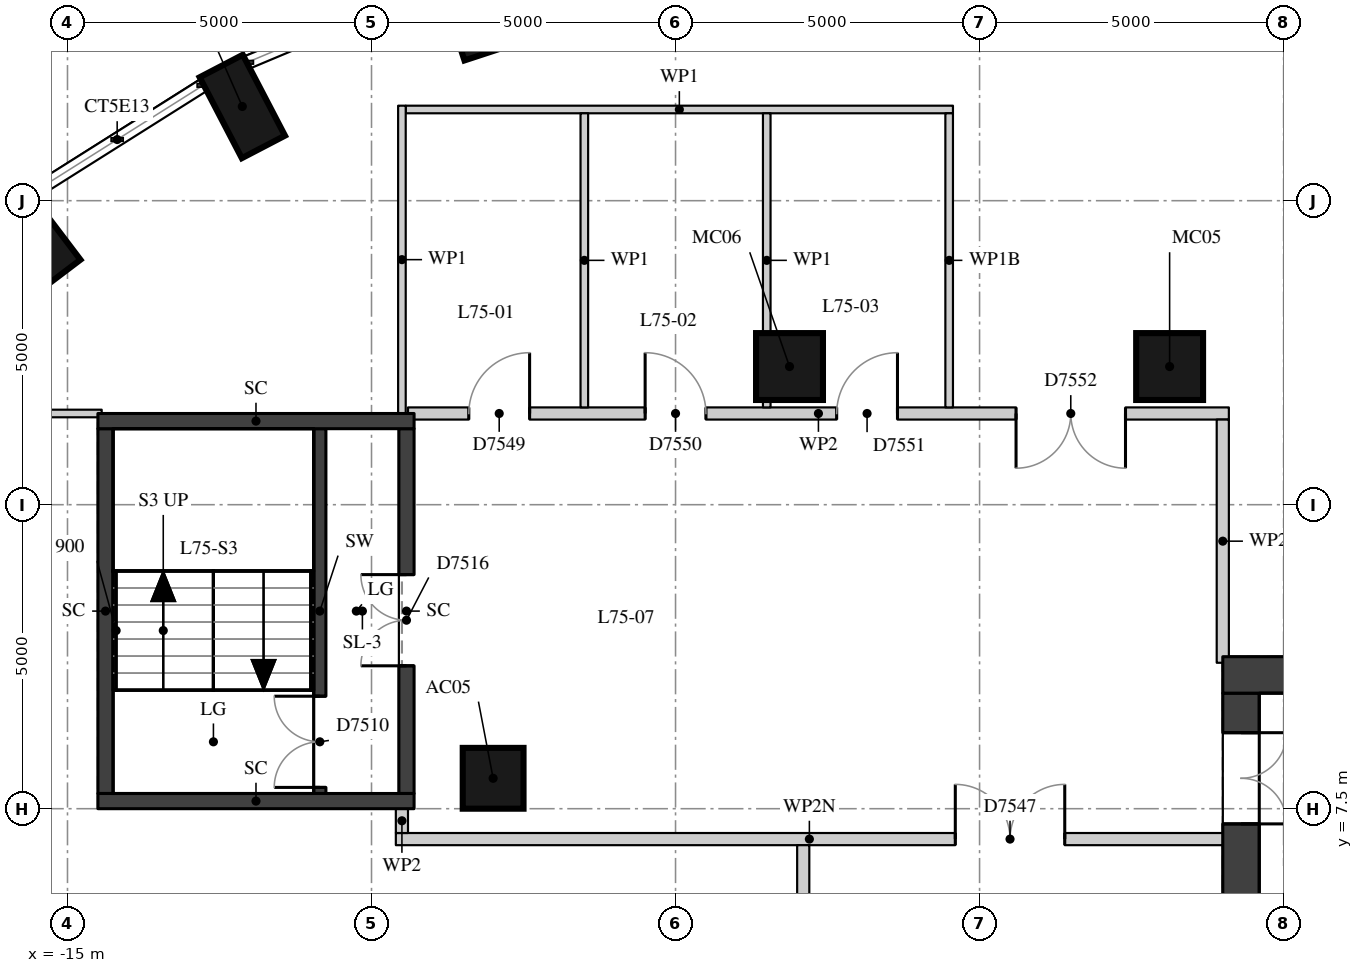
"""IFC4 building model, lengths in metres.
Left out: names, types, materials, properties, quantities, classifications, styles, units other than length and angle.
Written with IfcOpenShell. Run it as: python <this file> out.ifc"""

import sys

from ifc_helpers import new_model, si_unit, direction, frame, frame_2d, origin, origin_2d, place, context, subcontext, project, spatial, rectangle, extrude, element, fill, save


model = new_model("IFC4")
c1 = context("Model", 3, precision=1e-05, world=origin(), true_north=direction((0.0, 1.0)))
c2 = subcontext(c1, "Body", "Model", "MODEL_VIEW")
j1 = project(units=[si_unit("LENGTHUNIT", "METRE"), si_unit("PLANEANGLEUNIT", "RADIAN")], contexts=[c1])
p1 = place(None, origin())
s1 = spatial("IfcSite", under=j1, at=p1, CompositionType="ELEMENT")
p2 = place(p1, origin())
s2 = spatial("IfcBuilding", under=s1, at=p2, CompositionType="ELEMENT")
p3 = place(p2, frame((0.0, 0.0, 264.2)))
s3 = spatial("IfcBuildingStorey", under=s2, at=p3, CompositionType="ELEMENT", Elevation=264.2)
for number, where, z_axis, x_axis in (
    (1, (-8.326, 20.644, 0.0), (0.0, 0.0, 1.0), (-0.312, 0.95, 0.0)),
    (2, (-12.125, 19.05, 0.0), (0.0, 0.0, 1.0), (-0.462, 0.887, 0.0)),
    (3, (-15.559, 16.885, 0.0), (0.0, 0.0, 1.0), (-0.604, 0.797, 0.0)),
):
    element("IfcColumn", number, at=place(p3, frame(where, z_axis=z_axis, x_axis=x_axis)), inside=s3, PredefinedType="COLUMN", context=c2, shape_type="SweptSolid", body=[
        extrude(rectangle(XDim=1.5, YDim=0.8, at=origin_2d()), origin(), (0.0, 0.0, 1.0), 5.0),
    ])
p4 = place(p3, frame((-8.0, 8.0, 0.0), z_axis=(0.0, 0.0, 1.0), x_axis=(1.0, 0.0, 0.0)))
e4 = element("IfcColumn", 4, at=p4, inside=s3, PredefinedType="COLUMN", context=c2, shape_type="SweptSolid", body=[
    extrude(rectangle(XDim=1.0, YDim=1.0, at=origin_2d()), origin(), (0.0, 0.0, 1.0), 5.0),
])
for number, where, z_axis, x_axis in (
    (5, (3.126, 14.772, 0.0), (0.0, 0.0, 1.0), (1.0, 0.0, 0.0)),
    (6, (-3.126, 14.772, 0.0), (0.0, 0.0, 1.0), (1.0, 0.0, 0.0)),
):
    element("IfcColumn", number, at=place(p3, frame(where, z_axis=z_axis, x_axis=x_axis)), inside=s3, PredefinedType="COLUMN", context=c2, shape_type="SweptSolid", body=[
        extrude(rectangle(XDim=1.1, YDim=1.1, at=origin_2d()), origin(), (0.0, 0.0, 1.0), 5.0),
    ])
p5 = place(p3, frame((4.3, -9.4, 0.0), z_axis=(0.0, 0.0, 1.0), x_axis=(0.0, 1.0, 0.0)))
e7 = element("IfcWall", 7, at=p5, inside=s3, PredefinedType="SHEAR", context=c2, shape_type="SweptSolid", body=[
    extrude(rectangle(XDim=18.8, YDim=0.6, at=frame_2d((9.4, 0.0))), origin(), (0.0, 0.0, 1.0), 4.59),
])
p6 = place(p5, frame((0.65, 0.0, 0.0)))
e8 = element("IfcOpeningElement", 8, at=p6, cuts=e7, PredefinedType="OPENING", context=c2, shape_type="SweptSolid", body=[
    extrude(rectangle(XDim=1.5, YDim=2.1, at=frame_2d((0.75, 1.05))), frame((0.0, 0.31, 0.0), z_axis=(0.0, -1.0, 0.0), x_axis=(1.0, 0.0, 0.0)), (0.0, 0.0, 1.0), 0.62),
])
p7 = place(p5, frame((3.75, 0.0, 0.0)))
e9 = element("IfcOpeningElement", 9, at=p7, cuts=e7, PredefinedType="OPENING", context=c2, shape_type="SweptSolid", body=[
    extrude(rectangle(XDim=1.8, YDim=2.1, at=frame_2d((0.9, 1.05))), frame((0.0, 0.31, 0.0), z_axis=(0.0, -1.0, 0.0), x_axis=(1.0, 0.0, 0.0)), (0.0, 0.0, 1.0), 0.62),
])
p8 = place(p5, frame((6.25, 0.0, 0.0)))
e10 = element("IfcOpeningElement", 10, at=p8, cuts=e7, PredefinedType="OPENING", context=c2, shape_type="SweptSolid", body=[
    extrude(rectangle(XDim=1.1, YDim=2.1, at=frame_2d((0.55, 1.05))), frame((0.0, 0.31, 0.0), z_axis=(0.0, -1.0, 0.0), x_axis=(1.0, 0.0, 0.0)), (0.0, 0.0, 1.0), 0.62),
])
p9 = place(p5, frame((8.9, 0.0, 0.0)))
e11 = element("IfcOpeningElement", 11, at=p9, cuts=e7, PredefinedType="OPENING", context=c2, shape_type="SweptSolid", body=[
    extrude(rectangle(XDim=1.0, YDim=2.1, at=frame_2d((0.5, 1.05))), frame((0.0, 0.31, 0.0), z_axis=(0.0, -1.0, 0.0), x_axis=(1.0, 0.0, 0.0)), (0.0, 0.0, 1.0), 0.62),
])
p10 = place(p5, frame((11.45, 0.0, 0.0)))
e12 = element("IfcOpeningElement", 12, at=p10, cuts=e7, PredefinedType="OPENING", context=c2, shape_type="SweptSolid", body=[
    extrude(rectangle(XDim=1.1, YDim=2.1, at=frame_2d((0.55, 1.05))), frame((0.0, 0.31, 0.0), z_axis=(0.0, -1.0, 0.0), x_axis=(1.0, 0.0, 0.0)), (0.0, 0.0, 1.0), 0.62),
])
p11 = place(p5, frame((13.25, 0.0, 0.0)))
e13 = element("IfcOpeningElement", 13, at=p11, cuts=e7, PredefinedType="OPENING", context=c2, shape_type="SweptSolid", body=[
    extrude(rectangle(XDim=1.8, YDim=2.1, at=frame_2d((0.9, 1.05))), frame((0.0, 0.31, 0.0), z_axis=(0.0, -1.0, 0.0), x_axis=(1.0, 0.0, 0.0)), (0.0, 0.0, 1.0), 0.62),
])
p12 = place(p5, frame((16.65, 0.0, 0.0)))
e14 = element("IfcOpeningElement", 14, at=p12, cuts=e7, PredefinedType="OPENING", context=c2, shape_type="SweptSolid", body=[
    extrude(rectangle(XDim=1.5, YDim=2.1, at=frame_2d((0.75, 1.05))), frame((0.0, 0.31, 0.0), z_axis=(0.0, -1.0, 0.0), x_axis=(1.0, 0.0, 0.0)), (0.0, 0.0, 1.0), 0.62),
])
p13 = place(p3, frame((4.0, 9.7, 0.0), z_axis=(0.0, 0.0, 1.0), x_axis=(1.0, 0.0, 0.0)))
e15 = element("IfcWall", 15, at=p13, inside=s3, PredefinedType="SHEAR", context=c2, shape_type="SweptSolid", body=[
    extrude(rectangle(XDim=12.0, YDim=0.6, at=frame_2d((6.0, 0.0))), origin(), (0.0, 0.0, 1.0), 4.59),
])
p14 = place(p3, frame((-10.85, 7.75, 0.0), z_axis=(0.0, 0.0, 1.0), x_axis=(0.0, 1.0, 0.0)))
e16 = element("IfcWall", 16, at=p14, inside=s3, PredefinedType="SHEAR", context=c2, shape_type="SweptSolid", body=[
    extrude(rectangle(XDim=6.0, YDim=0.2, at=frame_2d((3.0, 0.0))), origin(), (0.0, 0.0, 1.0), 4.59),
])
p15 = place(p14, frame((0.1, 0.0, 0.0)))
e17 = element("IfcOpeningElement", 17, at=p15, cuts=e16, PredefinedType="OPENING", context=c2, shape_type="SweptSolid", body=[
    extrude(rectangle(XDim=1.5, YDim=2.1, at=frame_2d((0.75, 1.05))), frame((0.0, 0.11, 0.0), z_axis=(0.0, -1.0, 0.0), x_axis=(1.0, 0.0, 0.0)), (0.0, 0.0, 1.0), 0.22),
])
p16 = place(p3, frame((-14.375, 7.75, -0.35), z_axis=(0.0, 0.0, 1.0), x_axis=(0.0, 1.0, 0.0)))
e18 = element("IfcWall", 18, at=p16, inside=s3, PredefinedType="SHEAR", context=c2, shape_type="SweptSolid", body=[
    extrude(rectangle(XDim=6.0, YDim=0.25, at=frame_2d((3.0, 0.0))), origin(), (0.0, 0.0, 1.0), 4.94),
])
p17 = place(p3, frame((-9.425, 7.75, -0.35), z_axis=(0.0, 0.0, 1.0), x_axis=(0.0, 1.0, 0.0)))
e19 = element("IfcWall", 19, at=p17, inside=s3, PredefinedType="SHEAR", context=c2, shape_type="SweptSolid", body=[
    extrude(rectangle(XDim=6.0, YDim=0.25, at=frame_2d((3.0, 0.0))), origin(), (0.0, 0.0, 1.0), 4.94),
])
p18 = place(p17, frame((2.1, 0.0, 0.35)))
e20 = element("IfcOpeningElement", 20, at=p18, cuts=e19, PredefinedType="OPENING", context=c2, shape_type="SweptSolid", body=[
    extrude(rectangle(XDim=1.5, YDim=2.1, at=frame_2d((0.75, 1.05))), frame((0.0, 0.135, 0.0), z_axis=(0.0, -1.0, 0.0), x_axis=(1.0, 0.0, 0.0)), (0.0, 0.0, 1.0), 0.27),
])
for number, where, z_axis, x_axis in (
    (21, (-14.5, 13.875, -0.35), (0.0, 0.0, 1.0), (1.0, 0.0, 0.0)),
    (22, (-14.5, 7.625, -0.35), (0.0, 0.0, 1.0), (1.0, 0.0, 0.0)),
):
    element("IfcWall", number, at=place(p3, frame(where, z_axis=z_axis, x_axis=x_axis)), inside=s3, PredefinedType="SHEAR", context=c2, shape_type="SweptSolid", body=[
        extrude(rectangle(XDim=5.2, YDim=0.25, at=frame_2d((2.6, 0.0))), origin(), (0.0, 0.0, 1.0), 4.94),
    ])
p19 = place(p3, frame((-9.6, 7.0, 0.0), z_axis=(0.0, 0.0, 1.0), x_axis=(1.0, 0.0, 0.0)))
e23 = element("IfcWall", 23, at=p19, inside=s3, PredefinedType="PARTITIONING", context=c2, shape_type="SweptSolid", body=[
    extrude(rectangle(XDim=13.602, YDim=0.2, at=frame_2d((6.801, 0.0))), origin(), (0.0, 0.0, 1.0), 4.04),
])
p20 = place(p19, frame((9.201, 0.0, 0.0)))
e24 = element("IfcOpeningElement", 24, at=p20, cuts=e23, PredefinedType="OPENING", context=c2, shape_type="SweptSolid", body=[
    extrude(rectangle(XDim=1.8, YDim=2.1, at=frame_2d((0.9, 1.05))), frame((0.0, 0.11, 0.0), z_axis=(0.0, -1.0, 0.0), x_axis=(1.0, 0.0, 0.0)), (0.0, 0.0, 1.0), 0.22),
])
p21 = place(p3, frame((-19.121, 14.0, 0.0), z_axis=(0.0, 0.0, 1.0), x_axis=(1.0, 0.0, 0.0)))
e25 = element("IfcWall", 25, at=p21, inside=s3, PredefinedType="PARTITIONING", context=c2, shape_type="SweptSolid", body=[
    extrude(rectangle(XDim=4.684, YDim=0.125, at=frame_2d((2.342, 0.0))), origin(), (0.0, 0.0, 1.0), 4.59),
])
p22 = place(p21, frame((1.692, 0.0, 0.0)))
e26 = element("IfcOpeningElement", 26, at=p22, cuts=e25, PredefinedType="OPENING", context=c2, shape_type="SweptSolid", body=[
    extrude(rectangle(XDim=1.8, YDim=2.1, at=frame_2d((0.9, 1.05))), frame((0.0, 0.073, 0.0), z_axis=(0.0, -1.0, 0.0), x_axis=(1.0, 0.0, 0.0)), (0.0, 0.0, 1.0), 0.145),
])
p23 = place(p3, frame((-9.4, 14.0, 0.0), z_axis=(0.0, 0.0, 1.0), x_axis=(1.0, 0.0, 0.0)))
e27 = element("IfcWall", 27, at=p23, inside=s3, PredefinedType="PARTITIONING", context=c2, shape_type="SweptSolid", body=[
    extrude(rectangle(XDim=13.5, YDim=0.2, at=frame_2d((6.75, 0.0))), origin(), (0.0, 0.0, 1.0), 4.59),
])
p24 = place(p23, frame((10.0, 0.0, 0.0)))
e28 = element("IfcOpeningElement", 28, at=p24, cuts=e27, PredefinedType="OPENING", context=c2, shape_type="SweptSolid", body=[
    extrude(rectangle(XDim=1.8, YDim=2.1, at=frame_2d((0.9, 1.05))), frame((0.0, 0.11, 0.0), z_axis=(0.0, -1.0, 0.0), x_axis=(1.0, 0.0, 0.0)), (0.0, 0.0, 1.0), 0.22),
])
p25 = place(p23, frame((1.0, 0.0, 0.0)))
e29 = element("IfcOpeningElement", 29, at=p25, cuts=e27, PredefinedType="OPENING", context=c2, shape_type="SweptSolid", body=[
    extrude(rectangle(XDim=1.0, YDim=2.1, at=frame_2d((0.5, 1.05))), frame((0.0, 0.11, 0.0), z_axis=(0.0, -1.0, 0.0), x_axis=(1.0, 0.0, 0.0)), (0.0, 0.0, 1.0), 0.22),
])
p26 = place(p23, frame((3.9, 0.0, 0.0)))
e30 = element("IfcOpeningElement", 30, at=p26, cuts=e27, PredefinedType="OPENING", context=c2, shape_type="SweptSolid", body=[
    extrude(rectangle(XDim=1.0, YDim=2.1, at=frame_2d((0.5, 1.05))), frame((0.0, 0.11, 0.0), z_axis=(0.0, -1.0, 0.0), x_axis=(1.0, 0.0, 0.0)), (0.0, 0.0, 1.0), 0.22),
])
p27 = place(p23, frame((7.05, 0.0, 0.0)))
e31 = element("IfcOpeningElement", 31, at=p27, cuts=e27, PredefinedType="OPENING", context=c2, shape_type="SweptSolid", body=[
    extrude(rectangle(XDim=1.0, YDim=2.1, at=frame_2d((0.5, 1.05))), frame((0.0, 0.11, 0.0), z_axis=(0.0, -1.0, 0.0), x_axis=(1.0, 0.0, 0.0)), (0.0, 0.0, 1.0), 0.22),
])
p28 = place(p3, frame((-9.438, 19.0, 0.0), z_axis=(0.0, 0.0, 1.0), x_axis=(1.0, 0.0, 0.0)))
e32 = element("IfcWall", 32, at=p28, inside=s3, PredefinedType="PARTITIONING", context=c2, shape_type="SweptSolid", body=[
    extrude(rectangle(XDim=9.0, YDim=0.125, at=frame_2d((4.5, 0.0))), origin(), (0.0, 0.0, 1.0), 4.59),
])
p29 = place(p3, frame((-9.5, 7.1, 0.0), z_axis=(0.0, 0.0, 1.0), x_axis=(0.0, 1.0, 0.0)))
e33 = element("IfcWall", 33, at=p29, inside=s3, PredefinedType="PARTITIONING", context=c2, shape_type="SweptSolid", body=[
    extrude(rectangle(XDim=0.402, YDim=0.2, at=frame_2d((0.201, 0.0))), origin(), (0.0, 0.0, 1.0), 4.59),
])
p30 = place(p3, frame((-9.5, 13.998, 0.0), z_axis=(0.0, 0.0, 1.0), x_axis=(0.0, 1.0, 0.0)))
e34 = element("IfcWall", 34, at=p30, inside=s3, PredefinedType="PARTITIONING", context=c2, shape_type="SweptSolid", body=[
    extrude(rectangle(XDim=5.064, YDim=0.125, at=frame_2d((2.532, 0.0))), origin(), (0.0, 0.0, 1.0), 4.59),
])
for number, where, z_axis, x_axis in (
    (35, (-6.5, 14.1, 0.0), (0.0, 0.0, 1.0), (0.0, 1.0, 0.0)),
    (36, (-3.5, 14.1, 0.0), (0.0, 0.0, 1.0), (0.0, 1.0, 0.0)),
):
    element("IfcWall", number, at=place(p3, frame(where, z_axis=z_axis, x_axis=x_axis)), inside=s3, PredefinedType="PARTITIONING", context=c2, shape_type="SweptSolid", body=[
        extrude(rectangle(XDim=4.837, YDim=0.125, at=frame_2d((2.419, 0.0))), origin(), (0.0, 0.0, 1.0), 4.59),
    ])
p31 = place(p3, frame((-2.9, 0.866, 0.0), z_axis=(0.0, 0.0, 1.0), x_axis=(0.0, 1.0, 0.0)))
e37 = element("IfcWall", 37, at=p31, inside=s3, PredefinedType="PARTITIONING", context=c2, shape_type="SweptSolid", body=[
    extrude(rectangle(XDim=6.034, YDim=0.2, at=frame_2d((3.017, 0.0))), origin(), (0.0, 0.0, 1.0), 4.59),
])
p32 = place(p3, frame((-0.5, 14.1, 0.0), z_axis=(0.0, 0.0, 1.0), x_axis=(0.0, 1.0, 0.0)))
e38 = element("IfcWall", 38, at=p32, inside=s3, PredefinedType="PARTITIONING", context=c2, shape_type="SweptSolid", body=[
    extrude(rectangle(XDim=4.837, YDim=0.125, at=frame_2d((2.419, 0.0))), origin(), (0.0, 0.0, 1.0), 4.14),
])
p33 = place(p3, frame((4.0, 9.9, 0.0), z_axis=(0.0, 0.0, 1.0), x_axis=(0.0, 1.0, 0.0)))
e39 = element("IfcWall", 39, at=p33, inside=s3, PredefinedType="PARTITIONING", context=c2, shape_type="SweptSolid", body=[
    extrude(rectangle(XDim=4.0, YDim=0.2, at=frame_2d((2.0, 0.0))), origin(), (0.0, 0.0, 1.0), 4.59),
])
p34 = place(p12, origin())
e40 = element("IfcDoor", 40, at=p34, inside=s3, OperationType="DOUBLE_DOOR_SINGLE_SWING", PredefinedType="DOOR", context=c2, shape_type="SweptSolid", body=[
    extrude(rectangle(XDim=1.5, YDim=2.1, at=frame_2d((0.75, 1.05))), frame((0.0, 0.025, 0.0), z_axis=(0.0, -1.0, 0.0), x_axis=(1.0, 0.0, 0.0)), (0.0, 0.0, 1.0), 0.05),
])
fill(e14, e40)
p35 = place(p15, origin())
e41 = element("IfcDoor", 41, at=p35, inside=s3, OperationType="DOUBLE_DOOR_SINGLE_SWING", PredefinedType="DOOR", context=c2, shape_type="SweptSolid", body=[
    extrude(rectangle(XDim=1.5, YDim=2.1, at=frame_2d((0.75, 1.05))), frame((0.0, 0.025, 0.0), z_axis=(0.0, -1.0, 0.0), x_axis=(1.0, 0.0, 0.0)), (0.0, 0.0, 1.0), 0.05),
])
fill(e17, e41)
p36 = place(p18, origin())
e42 = element("IfcDoor", 42, at=p36, inside=s3, OperationType="DOUBLE_DOOR_SINGLE_SWING", PredefinedType="DOOR", context=c2, shape_type="SweptSolid", body=[
    extrude(rectangle(XDim=1.5, YDim=2.1, at=frame_2d((0.75, 1.05))), frame((0.0, 0.025, 0.0), z_axis=(0.0, -1.0, 0.0), x_axis=(1.0, 0.0, 0.0)), (0.0, 0.0, 1.0), 0.05),
])
fill(e20, e42)
p37 = place(p24, origin())
e43 = element("IfcDoor", 43, at=p37, inside=s3, OperationType="DOUBLE_DOOR_SINGLE_SWING", PredefinedType="DOOR", context=c2, shape_type="SweptSolid", body=[
    extrude(rectangle(XDim=1.8, YDim=2.1, at=frame_2d((0.9, 1.05))), frame((0.0, 0.025, 0.0), z_axis=(0.0, -1.0, 0.0), x_axis=(1.0, 0.0, 0.0)), (0.0, 0.0, 1.0), 0.05),
])
fill(e28, e43)
p38 = place(p20, origin())
e44 = element("IfcDoor", 44, at=p38, inside=s3, OperationType="DOUBLE_DOOR_SINGLE_SWING", PredefinedType="DOOR", context=c2, shape_type="SweptSolid", body=[
    extrude(rectangle(XDim=1.8, YDim=2.1, at=frame_2d((0.9, 1.05))), frame((0.0, 0.025, 0.0), z_axis=(0.0, -1.0, 0.0), x_axis=(1.0, 0.0, 0.0)), (0.0, 0.0, 1.0), 0.05),
])
fill(e24, e44)
p39 = place(p25, origin())
e45 = element("IfcDoor", 45, at=p39, inside=s3, OperationType="SINGLE_SWING_RIGHT", PredefinedType="DOOR", context=c2, shape_type="SweptSolid", body=[
    extrude(rectangle(XDim=1.0, YDim=2.1, at=frame_2d((0.5, 1.05))), frame((0.0, 0.025, 0.0), z_axis=(0.0, -1.0, 0.0), x_axis=(1.0, 0.0, 0.0)), (0.0, 0.0, 1.0), 0.05),
])
fill(e29, e45)
p40 = place(p26, origin())
e46 = element("IfcDoor", 46, at=p40, inside=s3, OperationType="SINGLE_SWING_LEFT", PredefinedType="DOOR", context=c2, shape_type="SweptSolid", body=[
    extrude(rectangle(XDim=1.0, YDim=2.1, at=frame_2d((0.5, 1.05))), frame((0.0, 0.025, 0.0), z_axis=(0.0, -1.0, 0.0), x_axis=(1.0, 0.0, 0.0)), (0.0, 0.0, 1.0), 0.05),
])
fill(e30, e46)
p41 = place(p27, origin())
e47 = element("IfcDoor", 47, at=p41, inside=s3, OperationType="SINGLE_SWING_RIGHT", PredefinedType="DOOR", context=c2, shape_type="SweptSolid", body=[
    extrude(rectangle(XDim=1.0, YDim=2.1, at=frame_2d((0.5, 1.05))), frame((0.0, 0.025, 0.0), z_axis=(0.0, -1.0, 0.0), x_axis=(1.0, 0.0, 0.0)), (0.0, 0.0, 1.0), 0.05),
])
fill(e31, e47)
save(model, sys.argv[1])
